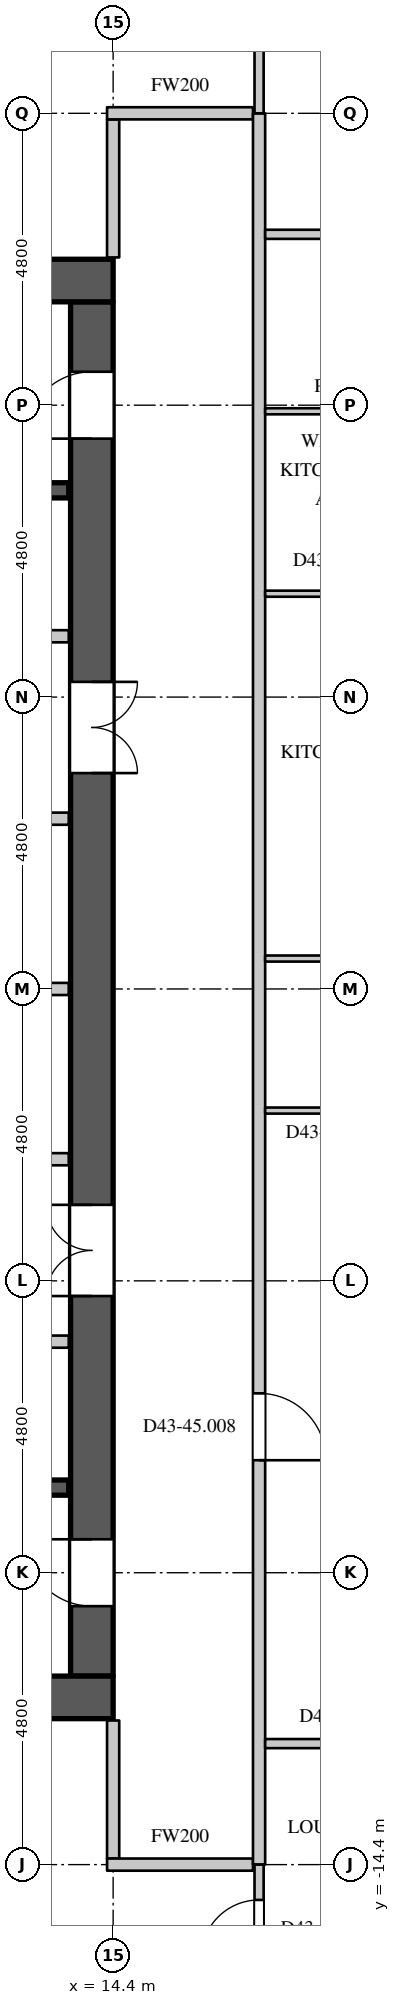
"""IFC4 building model, lengths in metres.
Left out: names, types, materials, properties, quantities, classifications, styles, units other than length and angle.
Written with IfcOpenShell. Run it as: python <this file> out.ifc"""

import sys

from ifc_helpers import new_model, si_unit, direction, frame, frame_2d, origin, place, context, subcontext, project, spatial, rectangle, extrude, element, fill, save


model = new_model("IFC4")
c1 = context("Model", 3, precision=1e-05, world=origin(), true_north=direction((0.0, 1.0)))
c2 = subcontext(c1, "Body", "Model", "MODEL_VIEW")
j1 = project(units=[si_unit("LENGTHUNIT", "METRE"), si_unit("PLANEANGLEUNIT", "RADIAN")], contexts=[c1])
p1 = place(None, origin())
s1 = spatial("IfcSite", under=j1, at=p1, CompositionType="ELEMENT")
p2 = place(p1, origin())
s2 = spatial("IfcBuilding", under=s1, at=p2, CompositionType="ELEMENT")
p3 = place(p2, frame((0.0, 0.0, 187.5)))
s3 = spatial("IfcBuildingStorey", under=s2, at=p3, CompositionType="ELEMENT", Elevation=187.5)
for number, where, z_axis, x_axis in (
    (1, (-14.4, 11.65, 0.0), (0.0, 0.0, 1.0), (1.0, 0.0, 0.0)),
    (2, (-14.4, -11.65, 0.0), (0.0, 0.0, 1.0), (1.0, 0.0, 0.0)),
):
    element("IfcWall", number, at=place(p3, frame(where, z_axis=z_axis, x_axis=x_axis)), inside=s3, PredefinedType="SHEAR", context=c2, shape_type="SweptSolid", body=[
        extrude(rectangle(XDim=28.8, YDim=0.7, at=frame_2d((14.4, 0.0))), origin(), (0.0, 0.0, 1.0), 4.2),
    ])
p4 = place(p3, frame((14.05, -11.3, 0.0), z_axis=(0.0, 0.0, 1.0), x_axis=(0.0, 1.0, 0.0)))
e3 = element("IfcWall", 3, at=p4, inside=s3, PredefinedType="SHEAR", context=c2, shape_type="SweptSolid", body=[
    extrude(rectangle(XDim=22.6, YDim=0.7, at=frame_2d((11.3, 0.0))), origin(), (0.0, 0.0, 1.0), 4.2),
])
p5 = place(p4, frame((20.35, 0.0, 0.0)))
e4 = element("IfcOpeningElement", 4, at=p5, cuts=e3, PredefinedType="OPENING", context=c2, shape_type="SweptSolid", body=[
    extrude(rectangle(XDim=1.1, YDim=2.2, at=frame_2d((0.55, 1.1))), frame((0.0, 0.36, 0.0), z_axis=(0.0, -1.0, 0.0), x_axis=(1.0, 0.0, 0.0)), (0.0, 0.0, 1.0), 0.72),
])
p6 = place(p4, frame((1.15, 0.0, 0.0)))
e5 = element("IfcOpeningElement", 5, at=p6, cuts=e3, PredefinedType="OPENING", context=c2, shape_type="SweptSolid", body=[
    extrude(rectangle(XDim=1.1, YDim=2.2, at=frame_2d((0.55, 1.1))), frame((0.0, 0.36, 0.0), z_axis=(0.0, -1.0, 0.0), x_axis=(1.0, 0.0, 0.0)), (0.0, 0.0, 1.0), 0.72),
])
p7 = place(p4, frame((14.85, 0.0, 0.0)))
e6 = element("IfcOpeningElement", 6, at=p7, cuts=e3, PredefinedType="OPENING", context=c2, shape_type="SweptSolid", body=[
    extrude(rectangle(XDim=1.5, YDim=2.4, at=frame_2d((0.75, 1.2))), frame((0.0, 0.36, 0.0), z_axis=(0.0, -1.0, 0.0), x_axis=(1.0, 0.0, 0.0)), (0.0, 0.0, 1.0), 0.72),
])
p8 = place(p4, frame((6.25, 0.0, 0.0)))
e7 = element("IfcOpeningElement", 7, at=p8, cuts=e3, PredefinedType="OPENING", context=c2, shape_type="SweptSolid", body=[
    extrude(rectangle(XDim=1.5, YDim=2.4, at=frame_2d((0.75, 1.2))), frame((0.0, 0.36, 0.0), z_axis=(0.0, -1.0, 0.0), x_axis=(1.0, 0.0, 0.0)), (0.0, 0.0, 1.0), 0.72),
])
p9 = place(p3, frame((-7.7, -5.8, 0.0), z_axis=(0.0, 0.0, 1.0), x_axis=(1.0, 0.0, 0.0)))
e8 = element("IfcWall", 8, at=p9, inside=s3, PredefinedType="PARTITIONING", context=c2, shape_type="SweptSolid", body=[
    extrude(rectangle(XDim=21.37, YDim=0.2, at=frame_2d((10.685, 0.0))), origin(), (0.0, 0.0, 1.0), 3.95),
])
p10 = place(p9, frame((5.35, 0.0, 0.0)))
e9 = element("IfcOpeningElement", 9, at=p10, cuts=e8, PredefinedType="OPENING", context=c2, shape_type="SweptSolid", body=[
    extrude(rectangle(XDim=0.9, YDim=2.2, at=frame_2d((0.45, 1.1))), frame((0.0, 0.11, 0.0), z_axis=(0.0, -1.0, 0.0), x_axis=(1.0, 0.0, 0.0)), (0.0, 0.0, 1.0), 0.22),
])
p11 = place(p9, frame((15.9, 0.0, 0.0)))
e10 = element("IfcOpeningElement", 10, at=p11, cuts=e8, PredefinedType="OPENING", context=c2, shape_type="SweptSolid", body=[
    extrude(rectangle(XDim=0.9, YDim=2.2, at=frame_2d((0.45, 1.1))), frame((0.0, 0.11, 0.0), z_axis=(0.0, -1.0, 0.0), x_axis=(1.0, 0.0, 0.0)), (0.0, 0.0, 1.0), 0.22),
])
p12 = place(p3, frame((7.82, 5.8, 0.0), z_axis=(0.0, 0.0, 1.0), x_axis=(1.0, 0.0, 0.0)))
e11 = element("IfcWall", 11, at=p12, inside=s3, PredefinedType="PARTITIONING", context=c2, shape_type="SweptSolid", body=[
    extrude(rectangle(XDim=5.85, YDim=0.2, at=frame_2d((2.925, 0.0))), origin(), (0.0, 0.0, 1.0), 3.95),
])
p13 = place(p12, frame((2.5, 0.0, 0.0)))
e12 = element("IfcOpeningElement", 12, at=p13, cuts=e11, PredefinedType="OPENING", context=c2, shape_type="SweptSolid", body=[
    extrude(rectangle(XDim=0.9, YDim=2.2, at=frame_2d((0.45, 1.1))), frame((0.0, 0.11, 0.0), z_axis=(0.0, -1.0, 0.0), x_axis=(1.0, 0.0, 0.0)), (0.0, 0.0, 1.0), 0.22),
])
p14 = place(p3, frame((14.4, -14.3, 0.0), z_axis=(0.0, 0.0, 1.0), x_axis=(0.0, 1.0, 0.0)))
e13 = element("IfcWall", 13, at=p14, inside=s3, PredefinedType="PARTITIONING", context=c2, shape_type="SweptSolid", body=[
    extrude(rectangle(XDim=2.27, YDim=0.2, at=frame_2d((1.135, 0.0))), origin(), (0.0, 0.0, 1.0), 3.95),
])
p15 = place(p3, frame((14.3, -14.4, 0.0), z_axis=(0.0, 0.0, 1.0), x_axis=(1.0, 0.0, 0.0)))
e14 = element("IfcWall", 14, at=p15, inside=s3, PredefinedType="PARTITIONING", context=c2, shape_type="SweptSolid", body=[
    extrude(rectangle(XDim=2.4, YDim=0.2, at=frame_2d((1.2, 0.0))), origin(), (0.0, 0.0, 1.0), 3.95),
])
p16 = place(p3, frame((14.4, 12.03, 0.0), z_axis=(0.0, 0.0, 1.0), x_axis=(0.0, 1.0, 0.0)))
e15 = element("IfcWall", 15, at=p16, inside=s3, PredefinedType="PARTITIONING", context=c2, shape_type="SweptSolid", body=[
    extrude(rectangle(XDim=2.27, YDim=0.2, at=frame_2d((1.135, 0.0))), origin(), (0.0, 0.0, 1.0), 3.95),
])
p17 = place(p3, frame((14.3, 14.4, 0.0), z_axis=(0.0, 0.0, 1.0), x_axis=(1.0, 0.0, 0.0)))
e16 = element("IfcWall", 16, at=p17, inside=s3, PredefinedType="PARTITIONING", context=c2, shape_type="SweptSolid", body=[
    extrude(rectangle(XDim=2.4, YDim=0.2, at=frame_2d((1.2, 0.0))), origin(), (0.0, 0.0, 1.0), 3.95),
])
p18 = place(p3, frame((16.8, -14.4, 0.0), z_axis=(0.0, 0.0, 1.0), x_axis=(0.0, 1.0, 0.0)))
e17 = element("IfcWall", 17, at=p18, inside=s3, PredefinedType="PARTITIONING", context=c2, shape_type="SweptSolid", body=[
    extrude(rectangle(XDim=28.8, YDim=0.2, at=frame_2d((14.4, 0.0))), origin(), (0.0, 0.0, 1.0), 3.95),
])
p19 = place(p18, frame((6.65, 0.0, 0.0)))
e18 = element("IfcOpeningElement", 18, at=p19, cuts=e17, PredefinedType="OPENING", context=c2, shape_type="SweptSolid", body=[
    extrude(rectangle(XDim=1.1, YDim=2.4, at=frame_2d((0.55, 1.2))), frame((0.0, 0.11, 0.0), z_axis=(0.0, -1.0, 0.0), x_axis=(1.0, 0.0, 0.0)), (0.0, 0.0, 1.0), 0.22),
])
p20 = place(p3, frame((16.8, -18.131, 0.0), z_axis=(0.0, 0.0, 1.0), x_axis=(0.0, 1.0, 0.0)))
e19 = element("IfcWall", 19, at=p20, inside=s3, PredefinedType="PARTITIONING", context=c2, shape_type="SweptSolid", body=[
    extrude(rectangle(XDim=3.731, YDim=0.15, at=frame_2d((1.865, 0.0))), origin(), (0.0, 0.0, 1.0), 3.95),
])
p21 = place(p20, frame((2.2, 0.0, 0.0)))
e20 = element("IfcOpeningElement", 20, at=p21, cuts=e19, PredefinedType="OPENING", context=c2, shape_type="SweptSolid", body=[
    extrude(rectangle(XDim=0.95, YDim=2.2, at=frame_2d((0.475, 1.1))), frame((0.0, 0.085, 0.0), z_axis=(0.0, -1.0, 0.0), x_axis=(1.0, 0.0, 0.0)), (0.0, 0.0, 1.0), 0.17),
])
p22 = place(p3, frame((16.9, -12.41, 0.0), z_axis=(0.0, 0.0, 1.0), x_axis=(1.0, 0.0, 0.0)))
e21 = element("IfcWall", 21, at=p22, inside=s3, PredefinedType="PARTITIONING", context=c2, shape_type="SweptSolid", body=[
    extrude(rectangle(XDim=5.629, YDim=0.15, at=frame_2d((2.815, 0.0))), origin(), (0.0, 0.0, 1.0), 3.95),
])
p23 = place(p22, frame((1.1, 0.0, 0.0)))
e22 = element("IfcOpeningElement", 22, at=p23, cuts=e21, PredefinedType="OPENING", context=c2, shape_type="SweptSolid", body=[
    extrude(rectangle(XDim=0.95, YDim=2.2, at=frame_2d((0.475, 1.1))), frame((0.0, 0.085, 0.0), z_axis=(0.0, -1.0, 0.0), x_axis=(1.0, 0.0, 0.0)), (0.0, 0.0, 1.0), 0.17),
])
p24 = place(p3, frame((16.9, 12.41, 0.0), z_axis=(0.0, 0.0, 1.0), x_axis=(1.0, 0.0, 0.0)))
e23 = element("IfcWall", 23, at=p24, inside=s3, PredefinedType="PARTITIONING", context=c2, shape_type="SweptSolid", body=[
    extrude(rectangle(XDim=5.629, YDim=0.15, at=frame_2d((2.815, 0.0))), origin(), (0.0, 0.0, 1.0), 3.95),
])
p25 = place(p24, frame((3.95, 0.0, 0.0)))
e24 = element("IfcOpeningElement", 24, at=p25, cuts=e23, PredefinedType="OPENING", context=c2, shape_type="SweptSolid", body=[
    extrude(rectangle(XDim=0.95, YDim=2.2, at=frame_2d((0.475, 1.1))), frame((0.0, 0.085, 0.0), z_axis=(0.0, -1.0, 0.0), x_axis=(1.0, 0.0, 0.0)), (0.0, 0.0, 1.0), 0.17),
])
p26 = place(p3, frame((16.8, 14.4, 0.0), z_axis=(0.0, 0.0, 1.0), x_axis=(0.0, 1.0, 0.0)))
e25 = element("IfcWall", 25, at=p26, inside=s3, PredefinedType="PARTITIONING", context=c2, shape_type="SweptSolid", body=[
    extrude(rectangle(XDim=3.731, YDim=0.15, at=frame_2d((1.865, 0.0))), origin(), (0.0, 0.0, 1.0), 3.95),
])
p27 = place(p26, frame((2.0, 0.0, 0.0)))
e26 = element("IfcOpeningElement", 26, at=p27, cuts=e25, PredefinedType="OPENING", context=c2, shape_type="SweptSolid", body=[
    extrude(rectangle(XDim=0.95, YDim=2.2, at=frame_2d((0.475, 1.1))), frame((0.0, 0.085, 0.0), z_axis=(0.0, -1.0, 0.0), x_axis=(1.0, 0.0, 0.0)), (0.0, 0.0, 1.0), 0.17),
])
p28 = place(p3, frame((7.8, -2.8, 0.0), z_axis=(0.0, 0.0, 1.0), x_axis=(1.0, 0.0, 0.0)))
e27 = element("IfcWall", 27, at=p28, inside=s3, PredefinedType="PARTITIONING", context=c2, shape_type="SweptSolid", body=[
    extrude(rectangle(XDim=5.87, YDim=0.2, at=frame_2d((2.935, 0.0))), origin(), (0.0, 0.0, 1.0), 3.95),
])
p29 = place(p28, frame((2.5, 0.0, 0.0)))
e28 = element("IfcOpeningElement", 28, at=p29, cuts=e27, PredefinedType="OPENING", context=c2, shape_type="SweptSolid", body=[
    extrude(rectangle(XDim=0.9, YDim=2.2, at=frame_2d((0.45, 1.1))), frame((0.0, 0.11, 0.0), z_axis=(0.0, -1.0, 0.0), x_axis=(1.0, 0.0, 0.0)), (0.0, 0.0, 1.0), 0.22),
])
p30 = place(p3, frame((7.8, 0.0, 0.0), z_axis=(0.0, 0.0, 1.0), x_axis=(1.0, 0.0, 0.0)))
e29 = element("IfcWall", 29, at=p30, inside=s3, PredefinedType="PARTITIONING", context=c2, shape_type="SweptSolid", body=[
    extrude(rectangle(XDim=5.87, YDim=0.2, at=frame_2d((2.935, 0.0))), origin(), (0.0, 0.0, 1.0), 3.95),
])
p31 = place(p3, frame((10.42, 2.8, 0.0), z_axis=(0.0, 0.0, 1.0), x_axis=(1.0, 0.0, 0.0)))
e30 = element("IfcWall", 30, at=p31, inside=s3, PredefinedType="PARTITIONING", context=c2, shape_type="SweptSolid", body=[
    extrude(rectangle(XDim=3.25, YDim=0.2, at=frame_2d((1.625, 0.0))), origin(), (0.0, 0.0, 1.0), 3.95),
])
p32 = place(p31, frame((1.3, 0.0, 0.0)))
e31 = element("IfcOpeningElement", 31, at=p32, cuts=e30, PredefinedType="OPENING", context=c2, shape_type="SweptSolid", body=[
    extrude(rectangle(XDim=0.6, YDim=2.0, at=frame_2d((0.3, 1.0))), frame((0.0, 0.11, 0.0), z_axis=(0.0, -1.0, 0.0), x_axis=(1.0, 0.0, 0.0)), (0.0, 0.0, 1.0), 0.22),
])
for number, where, z_axis, x_axis in (
    (32, (5.275, -8.2, 0.0), (0.0, 0.0, 1.0), (1.0, 0.0, 0.0)),
    (33, (5.275, 8.2, 0.0), (0.0, 0.0, 1.0), (1.0, 0.0, 0.0)),
):
    element("IfcWall", number, at=place(p3, frame(where, z_axis=z_axis, x_axis=x_axis)), inside=s3, PredefinedType="SHEAR", context=c2, shape_type="SweptSolid", body=[
        extrude(rectangle(XDim=8.395, YDim=0.25, at=frame_2d((4.198, 0.0))), origin(), (0.0, 0.0, 1.0), 3.95),
    ])
p33 = place(p3, frame((16.9, -2.0, 0.0), z_axis=(0.0, 0.0, 1.0), x_axis=(1.0, 0.0, 0.0)))
e34 = element("IfcWall", 34, at=p33, inside=s3, PredefinedType="PARTITIONING", context=c2, shape_type="SweptSolid", body=[
    extrude(rectangle(XDim=3.55, YDim=0.1, at=frame_2d((1.775, 0.0))), origin(), (0.0, 0.0, 1.0), 3.95),
])
p34 = place(p33, frame((1.3, 0.0, 0.0)))
e35 = element("IfcOpeningElement", 35, at=p34, cuts=e34, PredefinedType="OPENING", context=c2, shape_type="SweptSolid", body=[
    extrude(rectangle(XDim=0.9, YDim=2.2, at=frame_2d((0.45, 1.1))), frame((0.0, 0.06, 0.0), z_axis=(0.0, -1.0, 0.0), x_axis=(1.0, 0.0, 0.0)), (0.0, 0.0, 1.0), 0.12),
])
p35 = place(p3, frame((16.9, 0.5, 0.0), z_axis=(0.0, 0.0, 1.0), x_axis=(1.0, 0.0, 0.0)))
e36 = element("IfcWall", 36, at=p35, inside=s3, PredefinedType="PARTITIONING", context=c2, shape_type="SweptSolid", body=[
    extrude(rectangle(XDim=3.525, YDim=0.1, at=frame_2d((1.763, 0.0))), origin(), (0.0, 0.0, 1.0), 3.95),
])
p36 = place(p3, frame((16.9, 6.5, 0.0), z_axis=(0.0, 0.0, 1.0), x_axis=(1.0, 0.0, 0.0)))
e37 = element("IfcWall", 37, at=p36, inside=s3, PredefinedType="PARTITIONING", context=c2, shape_type="SweptSolid", body=[
    extrude(rectangle(XDim=3.525, YDim=0.1, at=frame_2d((1.763, 0.0))), origin(), (0.0, 0.0, 1.0), 3.95),
])
p37 = place(p36, frame((1.3, 0.0, 0.0)))
e38 = element("IfcOpeningElement", 38, at=p37, cuts=e37, PredefinedType="OPENING", context=c2, shape_type="SweptSolid", body=[
    extrude(rectangle(XDim=0.9, YDim=2.2, at=frame_2d((0.45, 1.1))), frame((0.0, 0.06, 0.0), z_axis=(0.0, -1.0, 0.0), x_axis=(1.0, 0.0, 0.0)), (0.0, 0.0, 1.0), 0.12),
])
p38 = place(p3, frame((16.9, 9.5, 0.0), z_axis=(0.0, 0.0, 1.0), x_axis=(1.0, 0.0, 0.0)))
e39 = element("IfcWall", 39, at=p38, inside=s3, PredefinedType="PARTITIONING", context=c2, shape_type="SweptSolid", body=[
    extrude(rectangle(XDim=2.575, YDim=0.1, at=frame_2d((1.288, 0.0))), origin(), (0.0, 0.0, 1.0), 3.95),
])
p39 = place(p5, origin())
e40 = element("IfcDoor", 40, at=p39, inside=s3, OperationType="SINGLE_SWING_LEFT", PredefinedType="DOOR", context=c2, shape_type="SweptSolid", body=[
    extrude(rectangle(XDim=1.1, YDim=2.2, at=frame_2d((0.55, 1.1))), frame((0.0, 0.345, 0.0), z_axis=(0.0, -1.0, 0.0), x_axis=(1.0, 0.0, 0.0)), (0.0, 0.0, 1.0), 0.05),
])
fill(e4, e40)
p40 = place(p6, origin())
e41 = element("IfcDoor", 41, at=p40, inside=s3, OperationType="SINGLE_SWING_RIGHT", PredefinedType="DOOR", context=c2, shape_type="SweptSolid", body=[
    extrude(rectangle(XDim=1.1, YDim=2.2, at=frame_2d((0.55, 1.1))), frame((0.0, 0.345, 0.0), z_axis=(0.0, -1.0, 0.0), x_axis=(1.0, 0.0, 0.0)), (0.0, 0.0, 1.0), 0.05),
])
fill(e5, e41)
p41 = place(p7, origin())
e42 = element("IfcDoor", 42, at=p41, inside=s3, OperationType="DOUBLE_DOOR_SINGLE_SWING", PredefinedType="DOOR", context=c2, shape_type="SweptSolid", body=[
    extrude(rectangle(XDim=1.5, YDim=2.4, at=frame_2d((0.75, 1.2))), frame((0.0, -0.295, 0.0), z_axis=(0.0, -1.0, 0.0), x_axis=(1.0, 0.0, 0.0)), (0.0, 0.0, 1.0), 0.05),
])
fill(e6, e42)
p42 = place(p8, origin())
e43 = element("IfcDoor", 43, at=p42, inside=s3, OperationType="DOUBLE_DOOR_SINGLE_SWING", PredefinedType="DOOR", context=c2, shape_type="SweptSolid", body=[
    extrude(rectangle(XDim=1.5, YDim=2.4, at=frame_2d((0.75, 1.2))), frame((0.0, 0.345, 0.0), z_axis=(0.0, -1.0, 0.0), x_axis=(1.0, 0.0, 0.0)), (0.0, 0.0, 1.0), 0.05),
])
fill(e7, e43)
p43 = place(p19, origin())
e44 = element("IfcDoor", 44, at=p43, inside=s3, OperationType="SINGLE_SWING_RIGHT", PredefinedType="DOOR", context=c2, shape_type="SweptSolid", body=[
    extrude(rectangle(XDim=1.1, YDim=2.4, at=frame_2d((0.55, 1.2))), frame((0.0, 0.025, 0.0), z_axis=(0.0, -1.0, 0.0), x_axis=(1.0, 0.0, 0.0)), (0.0, 0.0, 1.0), 0.05),
])
fill(e18, e44)
p44 = place(p21, origin())
e45 = element("IfcDoor", 45, at=p44, inside=s3, OperationType="SINGLE_SWING_LEFT", PredefinedType="DOOR", context=c2, shape_type="SweptSolid", body=[
    extrude(rectangle(XDim=0.95, YDim=2.2, at=frame_2d((0.475, 1.1))), frame((0.0, 0.025, 0.0), z_axis=(0.0, -1.0, 0.0), x_axis=(1.0, 0.0, 0.0)), (0.0, 0.0, 1.0), 0.05),
])
fill(e20, e45)
save(model, sys.argv[1])
